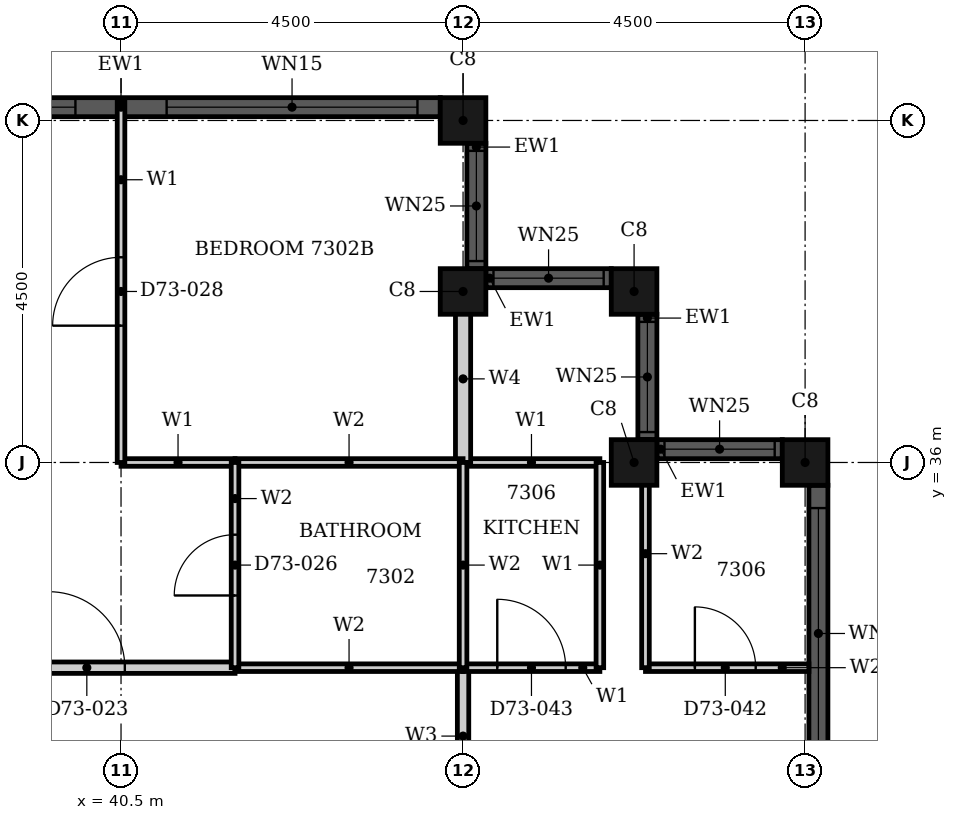
"""IFC4 building model, lengths in metres.
Left out: names, types, materials, properties, quantities, classifications, styles, units other than length and angle.
Written with IfcOpenShell. Run it as: python <this file> out.ifc"""

import sys

from ifc_helpers import new_model, si_unit, direction, frame, frame_2d, origin, origin_2d, place, context, subcontext, project, spatial, rectangle, hollow_rectangle, extrude, element, fill, save


model = new_model("IFC4")
c1 = context("Model", 3, precision=1e-05, world=origin(), true_north=direction((0.0, 1.0)))
c2 = subcontext(c1, "Body", "Model", "MODEL_VIEW")
j1 = project(units=[si_unit("LENGTHUNIT", "METRE"), si_unit("PLANEANGLEUNIT", "RADIAN")], contexts=[c1])
p1 = place(None, origin())
s1 = spatial("IfcSite", under=j1, at=p1, CompositionType="ELEMENT")
p2 = place(p1, origin())
s2 = spatial("IfcBuilding", under=s1, at=p2, CompositionType="ELEMENT")
p3 = place(p2, frame((0.0, 0.0, 287.1)))
s3 = spatial("IfcBuildingStorey", under=s2, at=p3, CompositionType="ELEMENT", Elevation=287.1)
for number, where, z_axis, x_axis in (
    (1, (49.5, 36.0, 0.0), (0.0, 0.0, 1.0), (1.0, 0.0, 0.0)),
    (2, (47.25, 36.0, 0.0), (0.0, 0.0, 1.0), (1.0, 0.0, 0.0)),
    (3, (47.25, 38.25, 0.0), (0.0, 0.0, 1.0), (1.0, 0.0, 0.0)),
    (4, (45.0, 38.25, 0.0), (0.0, 0.0, 1.0), (1.0, 0.0, 0.0)),
    (5, (45.0, 40.5, 0.0), (0.0, 0.0, 1.0), (1.0, 0.0, 0.0)),
):
    element("IfcColumn", number, at=place(p3, frame(where, z_axis=z_axis, x_axis=x_axis)), inside=s3, PredefinedType="COLUMN", context=c2, shape_type="SweptSolid", body=[
        extrude(hollow_rectangle(XDim=0.6, YDim=0.6, WallThickness=0.02, at=origin_2d()), origin(), (0.0, 0.0, 1.0), 3.7),
    ])
p4 = place(p3, frame((49.675, 27.3, 0.0), z_axis=(0.0, 0.0, 1.0), x_axis=(0.0, 1.0, 0.0)))
e6 = element("IfcWall", 6, at=p4, inside=s3, PredefinedType="SOLIDWALL", context=c2, shape_type="SweptSolid", body=[
    extrude(rectangle(XDim=8.4, YDim=0.25, at=frame_2d((4.2, 0.0))), origin(), (0.0, 0.0, 1.0), 3.7),
])
p5 = place(p4, frame((0.3, 0.0, 0.45)))
e7 = element("IfcOpeningElement", 7, at=p5, cuts=e6, PredefinedType="OPENING", context=c2, shape_type="SweptSolid", body=[
    extrude(rectangle(XDim=3.3, YDim=2.3, at=frame_2d((1.65, 1.15))), frame((0.0, 0.135, 0.0), z_axis=(0.0, -1.0, 0.0), x_axis=(1.0, 0.0, 0.0)), (0.0, 0.0, 1.0), 0.27),
])
p6 = place(p4, frame((4.8, 0.0, 0.45)))
e8 = element("IfcOpeningElement", 8, at=p6, cuts=e6, PredefinedType="OPENING", context=c2, shape_type="SweptSolid", body=[
    extrude(rectangle(XDim=3.3, YDim=2.3, at=frame_2d((1.65, 1.15))), frame((0.0, 0.135, 0.0), z_axis=(0.0, -1.0, 0.0), x_axis=(1.0, 0.0, 0.0)), (0.0, 0.0, 1.0), 0.27),
])
p7 = place(p3, frame((49.2, 36.175, 0.0), z_axis=(0.0, 0.0, 1.0), x_axis=(-1.0, 0.0, 0.0)))
e9 = element("IfcWall", 9, at=p7, inside=s3, PredefinedType="SOLIDWALL", context=c2, shape_type="SweptSolid", body=[
    extrude(rectangle(XDim=1.65, YDim=0.25, at=frame_2d((0.825, 0.0))), origin(), (0.0, 0.0, 1.0), 3.7),
])
p8 = place(p7, frame((0.1, 0.0, 0.9)))
e10 = element("IfcOpeningElement", 10, at=p8, cuts=e9, PredefinedType="OPENING", context=c2, shape_type="SweptSolid", body=[
    extrude(rectangle(XDim=1.45, YDim=1.85, at=frame_2d((0.725, 0.925))), frame((0.0, 0.135, 0.0), z_axis=(0.0, -1.0, 0.0), x_axis=(1.0, 0.0, 0.0)), (0.0, 0.0, 1.0), 0.27),
])
p9 = place(p3, frame((47.425, 36.3, 0.0), z_axis=(0.0, 0.0, 1.0), x_axis=(0.0, 1.0, 0.0)))
e11 = element("IfcWall", 11, at=p9, inside=s3, PredefinedType="SOLIDWALL", context=c2, shape_type="SweptSolid", body=[
    extrude(rectangle(XDim=1.65, YDim=0.25, at=frame_2d((0.825, 0.0))), origin(), (0.0, 0.0, 1.0), 3.7),
])
p10 = place(p9, frame((0.1, 0.0, 0.9)))
e12 = element("IfcOpeningElement", 12, at=p10, cuts=e11, PredefinedType="OPENING", context=c2, shape_type="SweptSolid", body=[
    extrude(rectangle(XDim=1.45, YDim=1.85, at=frame_2d((0.725, 0.925))), frame((0.0, 0.135, 0.0), z_axis=(0.0, -1.0, 0.0), x_axis=(1.0, 0.0, 0.0)), (0.0, 0.0, 1.0), 0.27),
])
p11 = place(p3, frame((46.95, 38.425, 0.0), z_axis=(0.0, 0.0, 1.0), x_axis=(-1.0, 0.0, 0.0)))
e13 = element("IfcWall", 13, at=p11, inside=s3, PredefinedType="SOLIDWALL", context=c2, shape_type="SweptSolid", body=[
    extrude(rectangle(XDim=1.65, YDim=0.25, at=frame_2d((0.825, 0.0))), origin(), (0.0, 0.0, 1.0), 3.7),
])
p12 = place(p11, frame((0.1, 0.0, 0.9)))
e14 = element("IfcOpeningElement", 14, at=p12, cuts=e13, PredefinedType="OPENING", context=c2, shape_type="SweptSolid", body=[
    extrude(rectangle(XDim=1.45, YDim=1.85, at=frame_2d((0.725, 0.925))), frame((0.0, 0.135, 0.0), z_axis=(0.0, -1.0, 0.0), x_axis=(1.0, 0.0, 0.0)), (0.0, 0.0, 1.0), 0.27),
])
p13 = place(p3, frame((45.175, 38.55, 0.0), z_axis=(0.0, 0.0, 1.0), x_axis=(0.0, 1.0, 0.0)))
e15 = element("IfcWall", 15, at=p13, inside=s3, PredefinedType="SOLIDWALL", context=c2, shape_type="SweptSolid", body=[
    extrude(rectangle(XDim=1.65, YDim=0.25, at=frame_2d((0.825, 0.0))), origin(), (0.0, 0.0, 1.0), 3.7),
])
p14 = place(p13, frame((0.1, 0.0, 0.9)))
e16 = element("IfcOpeningElement", 16, at=p14, cuts=e15, PredefinedType="OPENING", context=c2, shape_type="SweptSolid", body=[
    extrude(rectangle(XDim=1.45, YDim=1.85, at=frame_2d((0.725, 0.925))), frame((0.0, 0.135, 0.0), z_axis=(0.0, -1.0, 0.0), x_axis=(1.0, 0.0, 0.0)), (0.0, 0.0, 1.0), 0.27),
])
p15 = place(p3, frame((44.7, 40.675, 0.0), z_axis=(0.0, 0.0, 1.0), x_axis=(-1.0, 0.0, 0.0)))
e17 = element("IfcWall", 17, at=p15, inside=s3, PredefinedType="SOLIDWALL", context=c2, shape_type="SweptSolid", body=[
    extrude(rectangle(XDim=8.4, YDim=0.25, at=frame_2d((4.2, 0.0))), origin(), (0.0, 0.0, 1.0), 3.7),
])
p16 = place(p15, frame((0.3, 0.0, 0.45)))
e18 = element("IfcOpeningElement", 18, at=p16, cuts=e17, PredefinedType="OPENING", context=c2, shape_type="SweptSolid", body=[
    extrude(rectangle(XDim=3.3, YDim=2.3, at=frame_2d((1.65, 1.15))), frame((0.0, 0.135, 0.0), z_axis=(0.0, -1.0, 0.0), x_axis=(1.0, 0.0, 0.0)), (0.0, 0.0, 1.0), 0.27),
])
p17 = place(p15, frame((4.8, 0.0, 0.45)))
e19 = element("IfcOpeningElement", 19, at=p17, cuts=e17, PredefinedType="OPENING", context=c2, shape_type="SweptSolid", body=[
    extrude(rectangle(XDim=3.3, YDim=2.3, at=frame_2d((1.65, 1.15))), frame((0.0, 0.135, 0.0), z_axis=(0.0, -1.0, 0.0), x_axis=(1.0, 0.0, 0.0)), (0.0, 0.0, 1.0), 0.27),
])
p18 = place(p3, frame((35.1, 33.3, 0.0), z_axis=(0.0, 0.0, 1.0), x_axis=(1.0, 0.0, 0.0)))
e20 = element("IfcWall", 20, at=p18, inside=s3, PredefinedType="PARTITIONING", context=c2, shape_type="SweptSolid", body=[
    extrude(rectangle(XDim=6.9, YDim=0.15, at=frame_2d((3.45, 0.0))), origin(), (0.0, 0.0, 1.0), 3.4),
])
p19 = place(p18, frame((4.45, 0.0, 0.0)))
e21 = element("IfcOpeningElement", 21, at=p19, cuts=e20, PredefinedType="OPENING", context=c2, shape_type="SweptSolid", body=[
    extrude(rectangle(XDim=1.0, YDim=2.2, at=frame_2d((0.5, 1.1))), frame((0.0, 0.085, 0.0), z_axis=(0.0, -1.0, 0.0), x_axis=(1.0, 0.0, 0.0)), (0.0, 0.0, 1.0), 0.17),
])
p20 = place(p3, frame((45.0, 31.5, 0.0), z_axis=(0.0, 0.0, 1.0), x_axis=(0.0, 1.0, 0.0)))
e22 = element("IfcWall", 22, at=p20, inside=s3, PredefinedType="PARTITIONING", context=c2, shape_type="SweptSolid", body=[
    extrude(rectangle(XDim=1.8, YDim=0.15, at=frame_2d((0.9, 0.0))), origin(), (0.0, 0.0, 1.0), 3.4),
])
p21 = place(p3, frame((45.0, 33.3, 0.0), z_axis=(0.0, 0.0, 1.0), x_axis=(1.0, 0.0, 0.0)))
e23 = element("IfcWall", 23, at=p21, inside=s3, PredefinedType="PARTITIONING", context=c2, shape_type="SweptSolid", body=[
    extrude(rectangle(XDim=1.8, YDim=0.1, at=frame_2d((0.9, 0.0))), origin(), (0.0, 0.0, 1.0), 3.4),
])
p22 = place(p21, frame((0.45, 0.0, 0.0)))
e24 = element("IfcOpeningElement", 24, at=p22, cuts=e23, PredefinedType="OPENING", context=c2, shape_type="SweptSolid", body=[
    extrude(rectangle(XDim=0.9, YDim=2.1, at=frame_2d((0.45, 1.05))), frame((0.0, 0.06, 0.0), z_axis=(0.0, -1.0, 0.0), x_axis=(1.0, 0.0, 0.0)), (0.0, 0.0, 1.0), 0.12),
])
p23 = place(p3, frame((40.5, 36.0, 0.0), z_axis=(0.0, 0.0, 1.0), x_axis=(1.0, 0.0, 0.0)))
e25 = element("IfcWall", 25, at=p23, inside=s3, PredefinedType="PARTITIONING", context=c2, shape_type="SweptSolid", body=[
    extrude(rectangle(XDim=1.5, YDim=0.1, at=frame_2d((0.75, 0.0))), origin(), (0.0, 0.0, 1.0), 3.4),
])
p24 = place(p3, frame((45.0, 36.0, 0.0), z_axis=(0.0, 0.0, 1.0), x_axis=(1.0, 0.0, 0.0)))
e26 = element("IfcWall", 26, at=p24, inside=s3, PredefinedType="PARTITIONING", context=c2, shape_type="SweptSolid", body=[
    extrude(rectangle(XDim=1.8, YDim=0.1, at=frame_2d((0.9, 0.0))), origin(), (0.0, 0.0, 1.0), 3.4),
])
p25 = place(p3, frame((40.5, 36.0, 0.0), z_axis=(0.0, 0.0, 1.0), x_axis=(0.0, 1.0, 0.0)))
e27 = element("IfcWall", 27, at=p25, inside=s3, PredefinedType="PARTITIONING", context=c2, shape_type="SweptSolid", body=[
    extrude(rectangle(XDim=4.74, YDim=0.1, at=frame_2d((2.37, 0.0))), origin(), (0.0, 0.0, 1.0), 3.4),
])
p26 = place(p25, frame((1.8, 0.0, 0.0)))
e28 = element("IfcOpeningElement", 28, at=p26, cuts=e27, PredefinedType="OPENING", context=c2, shape_type="SweptSolid", body=[
    extrude(rectangle(XDim=0.9, YDim=2.1, at=frame_2d((0.45, 1.05))), frame((0.0, 0.06, 0.0), z_axis=(0.0, -1.0, 0.0), x_axis=(1.0, 0.0, 0.0)), (0.0, 0.0, 1.0), 0.12),
])
p27 = place(p3, frame((46.8, 33.3, 0.0), z_axis=(0.0, 0.0, 1.0), x_axis=(0.0, 1.0, 0.0)))
e29 = element("IfcWall", 29, at=p27, inside=s3, PredefinedType="PARTITIONING", context=c2, shape_type="SweptSolid", body=[
    extrude(rectangle(XDim=2.7, YDim=0.1, at=frame_2d((1.35, 0.0))), origin(), (0.0, 0.0, 1.0), 3.4),
])
p28 = place(p3, frame((45.0, 36.0, 0.0), z_axis=(0.0, 0.0, 1.0), x_axis=(0.0, 1.0, 0.0)))
e30 = element("IfcWall", 30, at=p28, inside=s3, PredefinedType="PARTITIONING", context=c2, shape_type="SweptSolid", body=[
    extrude(rectangle(XDim=2.2, YDim=0.2, at=frame_2d((1.1, 0.0))), origin(), (0.0, 0.0, 1.0), 3.4),
])
p29 = place(p3, frame((42.0, 33.3, 0.0), z_axis=(0.0, 0.0, 1.0), x_axis=(1.0, 0.0, 0.0)))
e31 = element("IfcWall", 31, at=p29, inside=s3, PredefinedType="PARTITIONING", context=c2, shape_type="SweptSolid", body=[
    extrude(rectangle(XDim=3.0, YDim=0.1, at=frame_2d((1.5, 0.0))), origin(), (0.0, 0.0, 1.0), 3.4),
])
p30 = place(p3, frame((47.4, 33.3, 0.0), z_axis=(0.0, 0.0, 1.0), x_axis=(1.0, 0.0, 0.0)))
e32 = element("IfcWall", 32, at=p30, inside=s3, PredefinedType="PARTITIONING", context=c2, shape_type="SweptSolid", body=[
    extrude(rectangle(XDim=2.15, YDim=0.1, at=frame_2d((1.075, 0.0))), origin(), (0.0, 0.0, 1.0), 3.4),
])
p31 = place(p30, frame((0.65, 0.0, 0.0)))
e33 = element("IfcOpeningElement", 33, at=p31, cuts=e32, PredefinedType="OPENING", context=c2, shape_type="SweptSolid", body=[
    extrude(rectangle(XDim=0.8, YDim=2.1, at=frame_2d((0.4, 1.05))), frame((0.0, 0.06, 0.0), z_axis=(0.0, -1.0, 0.0), x_axis=(1.0, 0.0, 0.0)), (0.0, 0.0, 1.0), 0.12),
])
p32 = place(p3, frame((42.0, 36.0, 0.0), z_axis=(0.0, 0.0, 1.0), x_axis=(1.0, 0.0, 0.0)))
e34 = element("IfcWall", 34, at=p32, inside=s3, PredefinedType="PARTITIONING", context=c2, shape_type="SweptSolid", body=[
    extrude(rectangle(XDim=3.0, YDim=0.1, at=frame_2d((1.5, 0.0))), origin(), (0.0, 0.0, 1.0), 3.4),
])
p33 = place(p3, frame((42.0, 33.3, 0.0), z_axis=(0.0, 0.0, 1.0), x_axis=(0.0, 1.0, 0.0)))
e35 = element("IfcWall", 35, at=p33, inside=s3, PredefinedType="PARTITIONING", context=c2, shape_type="SweptSolid", body=[
    extrude(rectangle(XDim=2.7, YDim=0.1, at=frame_2d((1.35, 0.0))), origin(), (0.0, 0.0, 1.0), 3.4),
])
p34 = place(p33, frame((0.95, 0.0, 0.0)))
e36 = element("IfcOpeningElement", 36, at=p34, cuts=e35, PredefinedType="OPENING", context=c2, shape_type="SweptSolid", body=[
    extrude(rectangle(XDim=0.8, YDim=2.1, at=frame_2d((0.4, 1.05))), frame((0.0, 0.06, 0.0), z_axis=(0.0, -1.0, 0.0), x_axis=(1.0, 0.0, 0.0)), (0.0, 0.0, 1.0), 0.12),
])
p35 = place(p3, frame((45.0, 33.3, 0.0), z_axis=(0.0, 0.0, 1.0), x_axis=(0.0, 1.0, 0.0)))
e37 = element("IfcWall", 37, at=p35, inside=s3, PredefinedType="PARTITIONING", context=c2, shape_type="SweptSolid", body=[
    extrude(rectangle(XDim=2.7, YDim=0.1, at=frame_2d((1.35, 0.0))), origin(), (0.0, 0.0, 1.0), 3.4),
])
p36 = place(p3, frame((47.4, 33.3, 0.0), z_axis=(0.0, 0.0, 1.0), x_axis=(0.0, 1.0, 0.0)))
e38 = element("IfcWall", 38, at=p36, inside=s3, PredefinedType="PARTITIONING", context=c2, shape_type="SweptSolid", body=[
    extrude(rectangle(XDim=3.0, YDim=0.1, at=frame_2d((1.5, 0.0))), origin(), (0.0, 0.0, 1.0), 3.4),
])
p37 = place(p6, origin())
e39 = element("IfcWindow", 39, at=p37, inside=s3, PartitioningType="SINGLE_PANEL", PredefinedType="WINDOW", context=c2, shape_type="SweptSolid", body=[
    extrude(rectangle(XDim=3.3, YDim=2.3, at=frame_2d((1.65, 1.15))), frame((0.0, 0.03, 0.0), z_axis=(0.0, -1.0, 0.0), x_axis=(1.0, 0.0, 0.0)), (0.0, 0.0, 1.0), 0.06),
])
fill(e8, e39)
p38 = place(p8, origin())
e40 = element("IfcWindow", 40, at=p38, inside=s3, PartitioningType="SINGLE_PANEL", PredefinedType="WINDOW", context=c2, shape_type="SweptSolid", body=[
    extrude(rectangle(XDim=1.45, YDim=1.85, at=frame_2d((0.725, 0.925))), frame((0.0, 0.03, 0.0), z_axis=(0.0, -1.0, 0.0), x_axis=(1.0, 0.0, 0.0)), (0.0, 0.0, 1.0), 0.06),
])
fill(e10, e40)
p39 = place(p10, origin())
e41 = element("IfcWindow", 41, at=p39, inside=s3, PartitioningType="SINGLE_PANEL", PredefinedType="WINDOW", context=c2, shape_type="SweptSolid", body=[
    extrude(rectangle(XDim=1.45, YDim=1.85, at=frame_2d((0.725, 0.925))), frame((0.0, 0.03, 0.0), z_axis=(0.0, -1.0, 0.0), x_axis=(1.0, 0.0, 0.0)), (0.0, 0.0, 1.0), 0.06),
])
fill(e12, e41)
p40 = place(p12, origin())
e42 = element("IfcWindow", 42, at=p40, inside=s3, PartitioningType="SINGLE_PANEL", PredefinedType="WINDOW", context=c2, shape_type="SweptSolid", body=[
    extrude(rectangle(XDim=1.45, YDim=1.85, at=frame_2d((0.725, 0.925))), frame((0.0, 0.03, 0.0), z_axis=(0.0, -1.0, 0.0), x_axis=(1.0, 0.0, 0.0)), (0.0, 0.0, 1.0), 0.06),
])
fill(e14, e42)
p41 = place(p14, origin())
e43 = element("IfcWindow", 43, at=p41, inside=s3, PartitioningType="SINGLE_PANEL", PredefinedType="WINDOW", context=c2, shape_type="SweptSolid", body=[
    extrude(rectangle(XDim=1.45, YDim=1.85, at=frame_2d((0.725, 0.925))), frame((0.0, 0.03, 0.0), z_axis=(0.0, -1.0, 0.0), x_axis=(1.0, 0.0, 0.0)), (0.0, 0.0, 1.0), 0.06),
])
fill(e16, e43)
p42 = place(p16, origin())
e44 = element("IfcWindow", 44, at=p42, inside=s3, PartitioningType="SINGLE_PANEL", PredefinedType="WINDOW", context=c2, shape_type="SweptSolid", body=[
    extrude(rectangle(XDim=3.3, YDim=2.3, at=frame_2d((1.65, 1.15))), frame((0.0, 0.03, 0.0), z_axis=(0.0, -1.0, 0.0), x_axis=(1.0, 0.0, 0.0)), (0.0, 0.0, 1.0), 0.06),
])
fill(e18, e44)
p43 = place(p17, origin())
e45 = element("IfcWindow", 45, at=p43, inside=s3, PartitioningType="SINGLE_PANEL", PredefinedType="WINDOW", context=c2, shape_type="SweptSolid", body=[
    extrude(rectangle(XDim=3.3, YDim=2.3, at=frame_2d((1.65, 1.15))), frame((0.0, 0.03, 0.0), z_axis=(0.0, -1.0, 0.0), x_axis=(1.0, 0.0, 0.0)), (0.0, 0.0, 1.0), 0.06),
])
fill(e19, e45)
p44 = place(p19, origin())
e46 = element("IfcDoor", 46, at=p44, inside=s3, OperationType="SINGLE_SWING_LEFT", PredefinedType="DOOR", context=c2, shape_type="SweptSolid", body=[
    extrude(rectangle(XDim=1.0, YDim=2.2, at=frame_2d((0.5, 1.1))), frame((0.0, 0.025, 0.0), z_axis=(0.0, -1.0, 0.0), x_axis=(1.0, 0.0, 0.0)), (0.0, 0.0, 1.0), 0.05),
])
fill(e21, e46)
p45 = place(p34, origin())
e47 = element("IfcDoor", 47, at=p45, inside=s3, OperationType="SINGLE_SWING_RIGHT", PredefinedType="DOOR", context=c2, shape_type="SweptSolid", body=[
    extrude(rectangle(XDim=0.8, YDim=2.1, at=frame_2d((0.4, 1.05))), frame((0.0, 0.025, 0.0), z_axis=(0.0, -1.0, 0.0), x_axis=(1.0, 0.0, 0.0)), (0.0, 0.0, 1.0), 0.05),
])
fill(e36, e47)
p46 = place(p26, origin())
e48 = element("IfcDoor", 48, at=p46, inside=s3, OperationType="SINGLE_SWING_LEFT", PredefinedType="DOOR", context=c2, shape_type="SweptSolid", body=[
    extrude(rectangle(XDim=0.9, YDim=2.1, at=frame_2d((0.45, 1.05))), frame((0.0, 0.025, 0.0), z_axis=(0.0, -1.0, 0.0), x_axis=(1.0, 0.0, 0.0)), (0.0, 0.0, 1.0), 0.05),
])
fill(e28, e48)
p47 = place(p31, origin())
e49 = element("IfcDoor", 49, at=p47, inside=s3, OperationType="SINGLE_SWING_RIGHT", PredefinedType="DOOR", context=c2, shape_type="SweptSolid", body=[
    extrude(rectangle(XDim=0.8, YDim=2.1, at=frame_2d((0.4, 1.05))), frame((0.0, 0.025, 0.0), z_axis=(0.0, -1.0, 0.0), x_axis=(1.0, 0.0, 0.0)), (0.0, 0.0, 1.0), 0.05),
])
fill(e33, e49)
p48 = place(p22, origin())
e50 = element("IfcDoor", 50, at=p48, inside=s3, OperationType="SINGLE_SWING_RIGHT", PredefinedType="DOOR", context=c2, shape_type="SweptSolid", body=[
    extrude(rectangle(XDim=0.9, YDim=2.1, at=frame_2d((0.45, 1.05))), frame((0.0, 0.025, 0.0), z_axis=(0.0, -1.0, 0.0), x_axis=(1.0, 0.0, 0.0)), (0.0, 0.0, 1.0), 0.05),
])
fill(e24, e50)
save(model, sys.argv[1])
